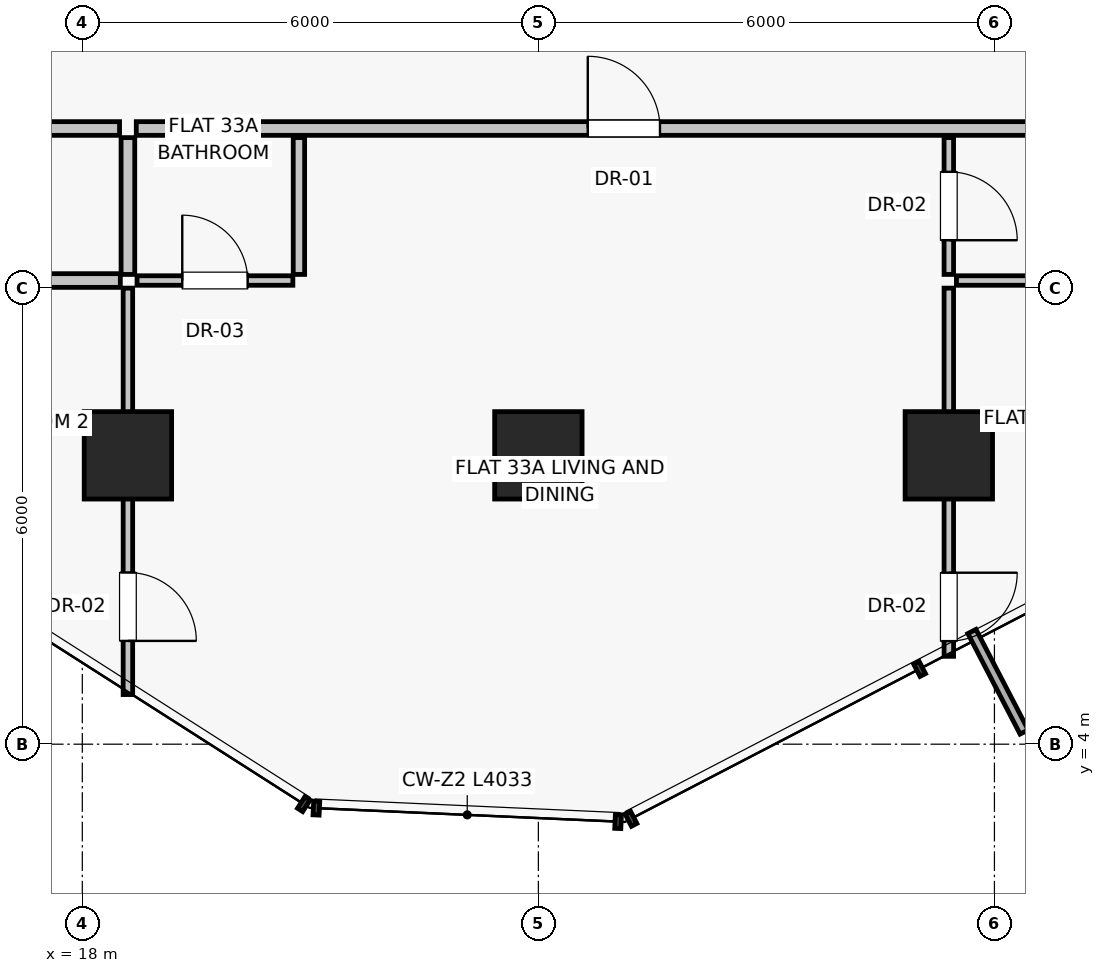
"""IFC4 building model, lengths in metres.
Left out: names, types, materials, properties, quantities, classifications, styles, units other than length and angle.
Written with IfcOpenShell. Run it as: python <this file> out.ifc"""

import sys

from ifc_helpers import new_model, si_unit, direction, frame, frame_2d, origin, origin_2d, place, context, subcontext, project, spatial, rectangle, extrude, source, transform, mapped, element, fill, save


model = new_model("IFC4")
c1 = context("Model", 3, precision=1e-05, world=origin(), true_north=direction((0.0, 1.0)))
c2 = subcontext(c1, "Body", "Model", "MODEL_VIEW")
j1 = project(units=[si_unit("LENGTHUNIT", "METRE"), si_unit("PLANEANGLEUNIT", "RADIAN")], contexts=[c1])
p1 = place(None, origin())
s1 = spatial("IfcSite", under=j1, at=p1, CompositionType="ELEMENT")
p2 = place(p1, origin())
s2 = spatial("IfcBuilding", under=s1, at=p2, CompositionType="ELEMENT")
p3 = place(p2, frame((0.0, 0.0, 119.75)))
s3 = spatial("IfcBuildingStorey", under=s2, at=p3, CompositionType="ELEMENT", Elevation=119.75)
for number, where, z_axis, x_axis in (
    (1, (18.6, 7.8, 0.0), (0.0, 0.0, 1.0), (1.0, 0.0, 0.0)),
    (2, (24.0, 7.8, 0.0), (0.0, 0.0, 1.0), (1.0, 0.0, 0.0)),
    (3, (29.4, 7.8, 0.0), (0.0, 0.0, 1.0), (1.0, 0.0, 0.0)),
):
    element("IfcColumn", number, at=place(p3, frame(where, z_axis=z_axis, x_axis=x_axis)), inside=s3, PredefinedType="COLUMN", context=c2, shape_type="SweptSolid", body=[
        extrude(rectangle(XDim=1.15, YDim=1.15, at=origin_2d()), origin(), (0.0, 0.0, 1.0), 3.25),
    ])
p4 = place(p3, frame((14.51, 12.1, 0.0), z_axis=(0.0, 0.0, 1.0), x_axis=(1.0, 0.0, 0.0)))
e4 = element("IfcWall", 4, at=p4, inside=s3, PredefinedType="PARTITIONING", context=c2, shape_type="SweptSolid", body=[
    extrude(rectangle(XDim=3.98, YDim=0.18, at=frame_2d((1.99, 0.0))), origin(), (0.0, 0.0, 1.0), 2.58),
])
p5 = place(p4, frame((1.49, 0.0, 0.0)))
e5 = element("IfcOpeningElement", 5, at=p5, cuts=e4, PredefinedType="OPENING", context=c2, shape_type="SweptSolid", body=[
    extrude(rectangle(XDim=1.0, YDim=2.01, at=frame_2d((0.5, 1.005))), frame((0.0, 0.1, 0.0), z_axis=(0.0, -1.0, 0.0), x_axis=(1.0, 0.0, 0.0)), (0.0, 0.0, 1.0), 0.2),
])
p6 = place(p3, frame((18.71, 12.1, 0.0), z_axis=(0.0, 0.0, 1.0), x_axis=(1.0, 0.0, 0.0)))
e6 = element("IfcWall", 6, at=p6, inside=s3, PredefinedType="PARTITIONING", context=c2, shape_type="SweptSolid", body=[
    extrude(rectangle(XDim=14.78, YDim=0.18, at=frame_2d((7.39, 0.0))), origin(), (0.0, 0.0, 1.0), 2.58),
])
p7 = place(p6, frame((5.94, 0.0, 0.0)))
e7 = element("IfcOpeningElement", 7, at=p7, cuts=e6, PredefinedType="OPENING", context=c2, shape_type="SweptSolid", body=[
    extrude(rectangle(XDim=0.95, YDim=2.02, at=frame_2d((0.475, 1.01))), frame((0.0, 0.1, 0.0), z_axis=(0.0, -1.0, 0.0), x_axis=(1.0, 0.0, 0.0)), (0.0, 0.0, 1.0), 0.2),
])
p8 = place(p3, frame((14.52, 10.1, 0.0), z_axis=(0.0, 0.0, 1.0), x_axis=(1.0, 0.0, 0.0)))
e8 = element("IfcWall", 8, at=p8, inside=s3, PredefinedType="PARTITIONING", context=c2, shape_type="SweptSolid", body=[
    extrude(rectangle(XDim=3.98, YDim=0.18, at=frame_2d((1.99, 0.0))), origin(), (0.0, 0.0, 1.0), 3.0),
])
p9 = place(p3, frame((18.6, 11.98, 0.0), z_axis=(0.0, 0.0, 1.0), x_axis=(0.0, -1.0, 0.0)))
e9 = element("IfcWall", 9, at=p9, inside=s3, PredefinedType="PARTITIONING", context=c2, shape_type="SweptSolid", body=[
    extrude(rectangle(XDim=1.8, YDim=0.18, at=frame_2d((0.9, 0.0))), origin(), (0.0, 0.0, 1.0), 2.378),
])
p10 = place(p3, frame((18.6, 10.0, 0.0), z_axis=(0.0, 0.0, 1.0), x_axis=(0.0, -1.0, 0.0)))
e10 = element("IfcWall", 10, at=p10, inside=s3, PredefinedType="PARTITIONING", context=c2, shape_type="SweptSolid", body=[
    extrude(rectangle(XDim=5.347, YDim=0.125, at=frame_2d((2.674, 0.0))), origin(), (0.0, 0.0, 1.0), 2.378),
])
p11 = place(p10, frame((3.741, 0.0, 0.0)))
e11 = element("IfcOpeningElement", 11, at=p11, cuts=e10, PredefinedType="OPENING", context=c2, shape_type="SweptSolid", body=[
    extrude(rectangle(XDim=0.9, YDim=2.01, at=frame_2d((0.45, 1.005))), frame((0.0, 0.073, 0.0), z_axis=(0.0, -1.0, 0.0), x_axis=(1.0, 0.0, 0.0)), (0.0, 0.0, 1.0), 0.145),
])
p12 = place(p3, frame((20.85, 11.98, 0.0), z_axis=(0.0, 0.0, 1.0), x_axis=(0.0, -1.0, 0.0)))
e12 = element("IfcWall", 12, at=p12, inside=s3, PredefinedType="PARTITIONING", context=c2, shape_type="SweptSolid", body=[
    extrude(rectangle(XDim=1.8, YDim=0.15, at=frame_2d((0.9, 0.0))), origin(), (0.0, 0.0, 1.0), 3.0),
])
p13 = place(p3, frame((18.72, 10.1, 0.0), z_axis=(0.0, 0.0, 1.0), x_axis=(1.0, 0.0, 0.0)))
e13 = element("IfcWall", 13, at=p13, inside=s3, PredefinedType="PARTITIONING", context=c2, shape_type="SweptSolid", body=[
    extrude(rectangle(XDim=2.05, YDim=0.125, at=frame_2d((1.025, 0.0))), origin(), (0.0, 0.0, 1.0), 3.0),
])
p14 = place(p13, frame((0.595, 0.0, 0.0)))
e14 = element("IfcOpeningElement", 14, at=p14, cuts=e13, PredefinedType="OPENING", context=c2, shape_type="SweptSolid", body=[
    extrude(rectangle(XDim=0.86, YDim=2.01, at=frame_2d((0.43, 1.005))), frame((0.0, 0.073, 0.0), z_axis=(0.0, -1.0, 0.0), x_axis=(1.0, 0.0, 0.0)), (0.0, 0.0, 1.0), 0.145),
])
p15 = place(p3, frame((29.4, 11.98, 0.0), z_axis=(0.0, 0.0, 1.0), x_axis=(0.0, -1.0, 0.0)))
e15 = element("IfcWall", 15, at=p15, inside=s3, PredefinedType="PARTITIONING", context=c2, shape_type="SweptSolid", body=[
    extrude(rectangle(XDim=1.8, YDim=0.125, at=frame_2d((0.9, 0.0))), origin(), (0.0, 0.0, 1.0), 2.378),
])
p16 = place(p15, frame((0.45, 0.0, 0.0)))
e16 = element("IfcOpeningElement", 16, at=p16, cuts=e15, PredefinedType="OPENING", context=c2, shape_type="SweptSolid", body=[
    extrude(rectangle(XDim=0.9, YDim=2.01, at=frame_2d((0.45, 1.005))), frame((0.0, 0.073, 0.0), z_axis=(0.0, -1.0, 0.0), x_axis=(1.0, 0.0, 0.0)), (0.0, 0.0, 1.0), 0.145),
])
p17 = place(p3, frame((29.5, 10.1, 0.0), z_axis=(0.0, 0.0, 1.0), x_axis=(1.0, 0.0, 0.0)))
e17 = element("IfcWall", 17, at=p17, inside=s3, PredefinedType="PARTITIONING", context=c2, shape_type="SweptSolid", body=[
    extrude(rectangle(XDim=3.98, YDim=0.125, at=frame_2d((1.99, 0.0))), origin(), (0.0, 0.0, 1.0), 3.0),
])
p18 = place(p3, frame((29.4, 10.0, 0.0), z_axis=(0.0, 0.0, 1.0), x_axis=(0.0, -1.0, 0.0)))
e18 = element("IfcWall", 18, at=p18, inside=s3, PredefinedType="PARTITIONING", context=c2, shape_type="SweptSolid", body=[
    extrude(rectangle(XDim=4.844, YDim=0.125, at=frame_2d((2.422, 0.0))), origin(), (0.0, 0.0, 1.0), 2.378),
])
p19 = place(p18, frame((3.744, 0.0, 0.0)))
e19 = element("IfcOpeningElement", 19, at=p19, cuts=e18, PredefinedType="OPENING", context=c2, shape_type="SweptSolid", body=[
    extrude(rectangle(XDim=0.9, YDim=2.01, at=frame_2d((0.45, 1.005))), frame((0.0, 0.073, 0.0), z_axis=(0.0, -1.0, 0.0), x_axis=(1.0, 0.0, 0.0)), (0.0, 0.0, 1.0), 0.145),
])
m1 = source(origin(), c2, "Body", "SweptSolid", [
    extrude(rectangle(XDim=0.95, YDim=2.02, at=frame_2d((0.475, 1.01))), frame((0.0, 0.025, 0.0), z_axis=(0.0, -1.0, 0.0), x_axis=(1.0, 0.0, 0.0)), (0.0, 0.0, 1.0), 0.05),
])
p20 = place(p7, origin())
e20 = element("IfcDoor", 20, at=p20, inside=s3, OperationType="SINGLE_SWING_LEFT", PredefinedType="DOOR", context=c2, shape_type="MappedRepresentation", body=[
    mapped(m1, transform((0.0, 0.0, 0.0), scale=1.0)),
])
fill(e7, e20)
m2 = source(origin(), c2, "Body", "SweptSolid", [
    extrude(rectangle(XDim=0.9, YDim=2.01, at=frame_2d((0.45, 1.005))), frame((0.0, 0.025, 0.0), z_axis=(0.0, -1.0, 0.0), x_axis=(1.0, 0.0, 0.0)), (0.0, 0.0, 1.0), 0.05),
])
p21 = place(p11, origin())
e21 = element("IfcDoor", 21, at=p21, inside=s3, OperationType="SINGLE_SWING_RIGHT", PredefinedType="DOOR", context=c2, shape_type="MappedRepresentation", body=[
    mapped(m2, transform((0.0, 0.0, 0.0), scale=1.0)),
])
fill(e11, e21)
m3 = source(origin(), c2, "Body", "SweptSolid", [
    extrude(rectangle(XDim=0.86, YDim=2.01, at=frame_2d((0.43, 1.005))), frame((0.0, 0.025, 0.0), z_axis=(0.0, -1.0, 0.0), x_axis=(1.0, 0.0, 0.0)), (0.0, 0.0, 1.0), 0.05),
])
p22 = place(p14, origin())
e22 = element("IfcDoor", 22, at=p22, inside=s3, OperationType="SINGLE_SWING_LEFT", PredefinedType="DOOR", context=c2, shape_type="MappedRepresentation", body=[
    mapped(m3, transform((0.0, 0.0, 0.0), scale=1.0)),
])
fill(e14, e22)
p23 = place(p16, origin())
e23 = element("IfcDoor", 23, at=p23, inside=s3, OperationType="SINGLE_SWING_RIGHT", PredefinedType="DOOR", context=c2, shape_type="MappedRepresentation", body=[
    mapped(m2, transform((0.0, 0.0, 0.0), scale=1.0)),
])
fill(e16, e23)
p24 = place(p19, origin())
e24 = element("IfcDoor", 24, at=p24, inside=s3, OperationType="SINGLE_SWING_LEFT", PredefinedType="DOOR", context=c2, shape_type="MappedRepresentation", body=[
    mapped(m2, transform((0.0, 0.0, 0.0), scale=1.0)),
])
fill(e19, e24)
save(model, sys.argv[1])
